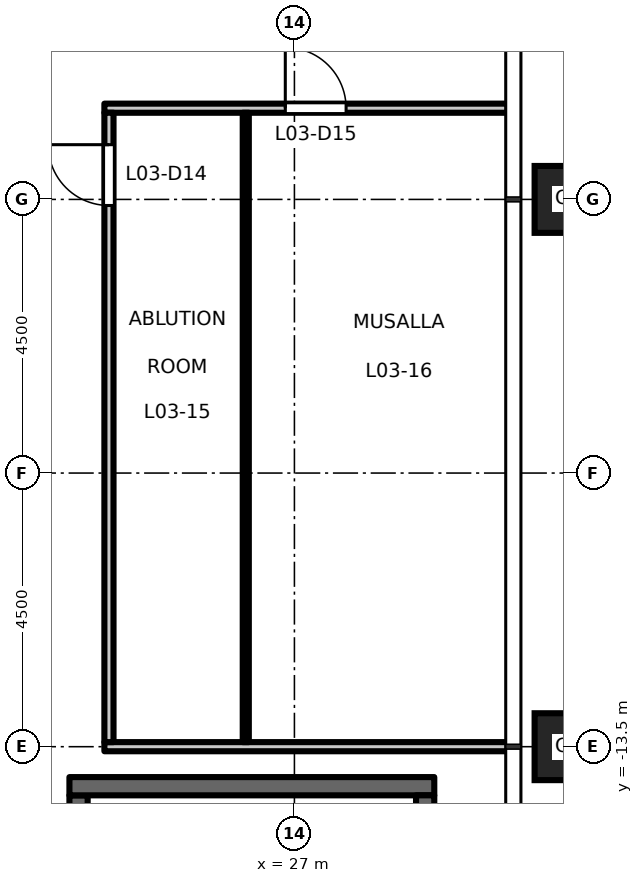
"""IFC4 building model, lengths in metres.
Left out: names, types, materials, properties, quantities, classifications, styles, units other than length and angle.
Written with IfcOpenShell. Run it as: python <this file> out.ifc"""

import sys

from ifc_helpers import new_model, si_unit, direction, frame, frame_2d, origin, origin_2d, place, context, subcontext, project, spatial, rectangle, hollow_rectangle, extrude, element, fill, save


model = new_model("IFC4")
c1 = context("Model", 3, precision=1e-05, world=origin(), true_north=direction((0.0, 1.0)))
c2 = subcontext(c1, "Body", "Model", "MODEL_VIEW")
j1 = project(units=[si_unit("LENGTHUNIT", "METRE"), si_unit("PLANEANGLEUNIT", "RADIAN")], contexts=[c1])
p1 = place(None, origin())
s1 = spatial("IfcSite", under=j1, at=p1, CompositionType="ELEMENT")
p2 = place(p1, origin())
s2 = spatial("IfcBuilding", under=s1, at=p2, CompositionType="ELEMENT")
p3 = place(p2, frame((0.0, 0.0, 17.2)))
s3 = spatial("IfcBuildingStorey", under=s2, at=p3, CompositionType="ELEMENT", Elevation=17.2)
for number, where, z_axis, x_axis in (
    (1, (31.5, -13.5, 0.0), (0.0, 0.0, 1.0), (1.0, 0.0, 0.0)),
    (2, (31.5, -4.5, 0.0), (0.0, 0.0, 1.0), (1.0, 0.0, 0.0)),
):
    element("IfcColumn", number, at=place(p3, frame(where, z_axis=z_axis, x_axis=x_axis)), inside=s3, PredefinedType="COLUMN", context=c2, shape_type="SweptSolid", body=[
        extrude(hollow_rectangle(XDim=1.1, YDim=1.1, WallThickness=0.07, at=origin_2d()), origin(), (0.0, 0.0, 1.0), 5.0),
    ])
p4 = place(p3, frame((23.45, -14.3, 0.0), z_axis=(0.0, 0.0, 1.0), x_axis=(0.0, -1.0, 0.0)))
e3 = element("IfcWall", 3, at=p4, inside=s3, PredefinedType="SHEAR", context=c2, shape_type="SweptSolid", body=[
    extrude(rectangle(XDim=10.2, YDim=0.3, at=frame_2d((5.1, 0.0))), origin(), (0.0, 0.0, 1.0), 4.85),
])
p5 = place(p4, frame((0.2, 0.0, 0.0)))
e4 = element("IfcOpeningElement", 4, at=p5, cuts=e3, PredefinedType="OPENING", context=c2, shape_type="SweptSolid", body=[
    extrude(rectangle(XDim=1.8, YDim=2.1, at=frame_2d((0.9, 1.05))), frame((0.0, 0.16, 0.0), z_axis=(0.0, -1.0, 0.0), x_axis=(1.0, 0.0, 0.0)), (0.0, 0.0, 1.0), 0.32),
])
p6 = place(p3, frame((29.3, -14.15, 0.0), z_axis=(0.0, 0.0, 1.0), x_axis=(-1.0, 0.0, 0.0)))
e5 = element("IfcWall", 5, at=p6, inside=s3, PredefinedType="SHEAR", context=c2, shape_type="SweptSolid", body=[
    extrude(rectangle(XDim=6.0, YDim=0.3, at=frame_2d((3.0, 0.0))), origin(), (0.0, 0.0, 1.0), 4.85),
])
p7 = place(p3, frame((29.15, -14.3, 0.0), z_axis=(0.0, 0.0, 1.0), x_axis=(0.0, -1.0, 0.0)))
e6 = element("IfcWall", 6, at=p7, inside=s3, PredefinedType="SHEAR", context=c2, shape_type="SweptSolid", body=[
    extrude(rectangle(XDim=10.2, YDim=0.3, at=frame_2d((5.1, 0.0))), origin(), (0.0, 0.0, 1.0), 4.85),
])
p8 = place(p3, frame((23.875, -13.5, 0.0), z_axis=(0.0, 0.0, 1.0), x_axis=(1.0, 0.0, 0.0)))
e7 = element("IfcWall", 7, at=p8, inside=s3, PredefinedType="PARTITIONING", context=c2, shape_type="SweptSolid", body=[
    extrude(rectangle(XDim=6.635, YDim=0.15, at=frame_2d((3.317, 0.0))), origin(), (0.0, 0.0, 1.0), 3.85),
])
p9 = place(p3, frame((23.875, -3.0, 0.0), z_axis=(0.0, 0.0, 1.0), x_axis=(1.0, 0.0, 0.0)))
e8 = element("IfcWall", 8, at=p9, inside=s3, PredefinedType="PARTITIONING", context=c2, shape_type="SweptSolid", body=[
    extrude(rectangle(XDim=6.635, YDim=0.15, at=frame_2d((3.317, 0.0))), origin(), (0.0, 0.0, 1.0), 4.85),
])
p10 = place(p9, frame((2.975, 0.0, 0.0)))
e9 = element("IfcOpeningElement", 9, at=p10, cuts=e8, PredefinedType="OPENING", context=c2, shape_type="SweptSolid", body=[
    extrude(rectangle(XDim=1.0, YDim=2.1, at=frame_2d((0.5, 1.05))), frame((0.0, 0.085, 0.0), z_axis=(0.0, -1.0, 0.0), x_axis=(1.0, 0.0, 0.0)), (0.0, 0.0, 1.0), 0.17),
])
p11 = place(p3, frame((23.95, -13.425, 0.0), z_axis=(0.0, 0.0, 1.0), x_axis=(0.0, 1.0, 0.0)))
e10 = element("IfcWall", 10, at=p11, inside=s3, PredefinedType="PARTITIONING", context=c2, shape_type="SweptSolid", body=[
    extrude(rectangle(XDim=10.35, YDim=0.15, at=frame_2d((5.175, 0.0))), origin(), (0.0, 0.0, 1.0), 4.85),
])
p12 = place(p11, frame((8.825, 0.0, 0.0)))
e11 = element("IfcOpeningElement", 11, at=p12, cuts=e10, PredefinedType="OPENING", context=c2, shape_type="SweptSolid", body=[
    extrude(rectangle(XDim=1.0, YDim=2.1, at=frame_2d((0.5, 1.05))), frame((0.0, 0.085, 0.0), z_axis=(0.0, -1.0, 0.0), x_axis=(1.0, 0.0, 0.0)), (0.0, 0.0, 1.0), 0.17),
])
p13 = place(p3, frame((26.2, -13.425, 0.0), z_axis=(0.0, 0.0, 1.0), x_axis=(0.0, 1.0, 0.0)))
e12 = element("IfcWall", 12, at=p13, inside=s3, PredefinedType="PARTITIONING", context=c2, shape_type="SweptSolid", body=[
    extrude(rectangle(XDim=10.35, YDim=0.1, at=frame_2d((5.175, 0.0))), origin(), (0.0, 0.0, 1.0), 4.85),
])
p14 = place(p12, origin())
e13 = element("IfcDoor", 13, at=p14, inside=s3, OperationType="SINGLE_SWING_RIGHT", PredefinedType="DOOR", context=c2, shape_type="SweptSolid", body=[
    extrude(rectangle(XDim=1.0, YDim=2.1, at=frame_2d((0.5, 1.05))), frame((0.0, 0.025, 0.0), z_axis=(0.0, -1.0, 0.0), x_axis=(1.0, 0.0, 0.0)), (0.0, 0.0, 1.0), 0.05),
])
fill(e11, e13)
p15 = place(p10, origin())
e14 = element("IfcDoor", 14, at=p15, inside=s3, OperationType="SINGLE_SWING_LEFT", PredefinedType="DOOR", context=c2, shape_type="SweptSolid", body=[
    extrude(rectangle(XDim=1.0, YDim=2.1, at=frame_2d((0.5, 1.05))), frame((0.0, 0.025, 0.0), z_axis=(0.0, -1.0, 0.0), x_axis=(1.0, 0.0, 0.0)), (0.0, 0.0, 1.0), 0.05),
])
fill(e9, e14)
save(model, sys.argv[1])
